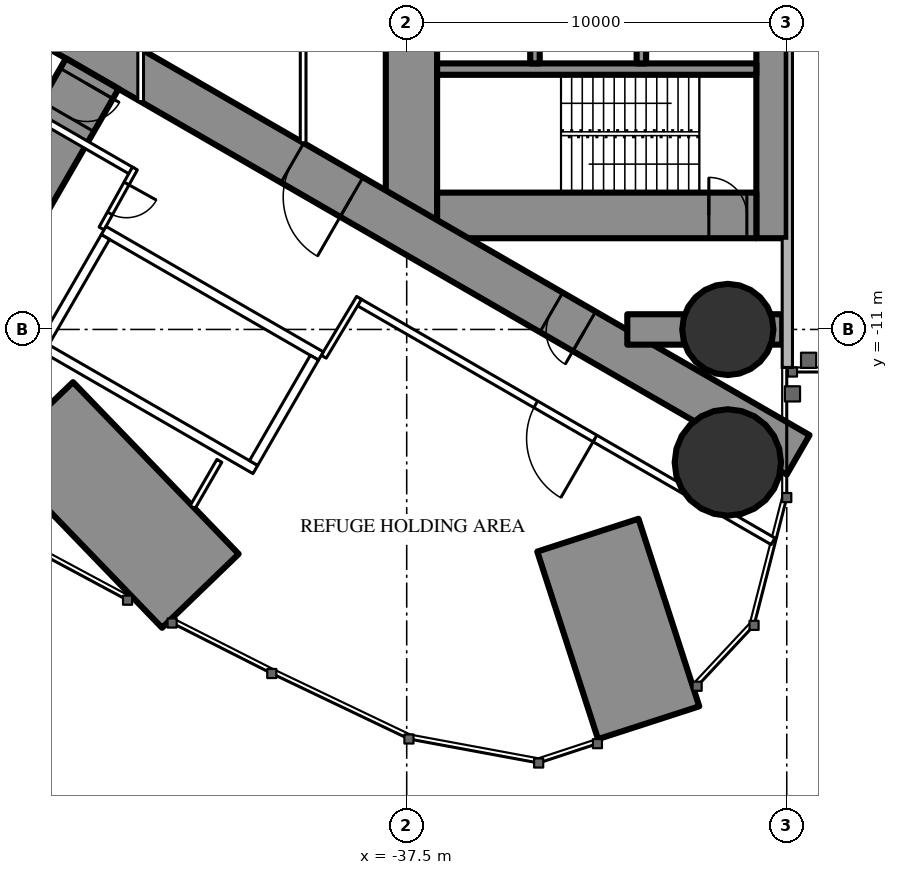
"""IFC4 building model, lengths in metres.
Left out: names, types, materials, properties, quantities, classifications, styles, units other than length and angle.
Written with IfcOpenShell. Run it as: python <this file> out.ifc"""

import sys

from ifc_helpers import new_model, si_unit, direction, frame, frame_2d, origin, origin_2d, place, context, subcontext, project, spatial, rectangle, circle, hollow_circle, extrude, element, fill, save


model = new_model("IFC4")
c1 = context("Model", 3, precision=1e-05, world=origin(), true_north=direction((0.0, 1.0)))
c2 = subcontext(c1, "Body", "Model", "MODEL_VIEW")
j1 = project(units=[si_unit("LENGTHUNIT", "METRE"), si_unit("PLANEANGLEUNIT", "RADIAN")], contexts=[c1])
p1 = place(None, origin())
s1 = spatial("IfcSite", under=j1, at=p1, CompositionType="ELEMENT")
p2 = place(p1, origin())
s2 = spatial("IfcBuilding", under=s1, at=p2, CompositionType="ELEMENT")
p3 = place(p2, frame((0.0, 0.0, 205.3)))
s3 = spatial("IfcBuildingStorey", under=s2, at=p3, CompositionType="ELEMENT", Elevation=205.3)
p4 = place(p3, frame((-31.134, -21.348, 0.0), z_axis=(0.0, 0.0, 1.0), x_axis=(-0.308266410133, 0.951300068529, 0.0)))
e1 = element("IfcWall", 1, at=p4, inside=s3, PredefinedType="SHEAR", context=c2, shape_type="SweptSolid", body=[
    extrude(rectangle(XDim=5.187, YDim=2.8, at=frame_2d((2.593, 0.0))), origin(), (0.0, 0.0, 1.0), 5.0),
])
p5 = place(p3, frame((-29.05, -11.0, 0.0), z_axis=(0.0, 0.0, 1.0), x_axis=(1.0, 0.0, 0.0)))
e2 = element("IfcColumn", 2, at=p5, inside=s3, PredefinedType="COLUMN", context=c2, shape_type="SweptSolid", body=[
    extrude(hollow_circle(Radius=1.2, WallThickness=0.09, at=origin_2d()), origin(), (0.0, 0.0, 1.0), 5.0),
])
p6 = place(p3, frame((-29.05, -14.5, 0.0), z_axis=(0.0, 0.0, 1.0), x_axis=(1.0, 0.0, 0.0)))
e3 = element("IfcColumn", 3, at=p6, inside=s3, PredefinedType="COLUMN", context=c2, shape_type="SweptSolid", body=[
    extrude(circle(Radius=1.4, at=origin_2d()), origin(), (0.0, 0.0, 1.0), 5.0),
])
p7 = place(p3, frame((-42.929, -17.879, 0.0), z_axis=(0.0, 0.0, 1.0), x_axis=(-0.694103918888, 0.719874815356, 0.0)))
e4 = element("IfcWall", 4, at=p7, inside=s3, PredefinedType="SHEAR", context=c2, shape_type="SweptSolid", body=[
    extrude(rectangle(XDim=6.281, YDim=2.8, at=frame_2d((3.141, 0.0))), origin(), (0.0, 0.0, 1.0), 5.0),
])
p8 = place(p3, frame((-27.9, 8.6, 0.0), z_axis=(0.0, 0.0, 1.0), x_axis=(0.0, -1.0, 0.0)))
e5 = element("IfcWall", 5, at=p8, inside=s3, PredefinedType="SHEAR", context=c2, shape_type="SweptSolid", body=[
    extrude(rectangle(XDim=17.2, YDim=0.8, at=frame_2d((8.6, 0.0))), origin(), (0.0, 0.0, 1.0), 5.0),
])
p9 = place(p8, frame((6.95, 0.0, 0.0)))
e6 = element("IfcOpeningElement", 6, at=p9, cuts=e5, PredefinedType="OPENING", context=c2, shape_type="SweptSolid", body=[
    extrude(rectangle(XDim=0.9, YDim=2.2, at=frame_2d((0.45, 1.1))), frame((0.0, 0.41, 0.0), z_axis=(0.0, -1.0, 0.0), x_axis=(1.0, 0.0, 0.0)), (0.0, 0.0, 1.0), 0.82),
])
p10 = place(p3, frame((-37.375, 8.6, 0.0), z_axis=(0.0, 0.0, 1.0), x_axis=(0.0, -1.0, 0.0)))
e7 = element("IfcWall", 7, at=p10, inside=s3, PredefinedType="SHEAR", context=c2, shape_type="SweptSolid", body=[
    extrude(rectangle(XDim=17.2, YDim=1.35, at=frame_2d((8.6, 0.0))), origin(), (0.0, 0.0, 1.0), 5.0),
])
p11 = place(p10, frame((7.7, 0.0, 0.0)))
e8 = element("IfcOpeningElement", 8, at=p11, cuts=e7, PredefinedType="OPENING", context=c2, shape_type="SweptSolid", body=[
    extrude(rectangle(XDim=1.8, YDim=2.2, at=frame_2d((0.9, 1.1))), frame((0.0, 0.685, 0.0), z_axis=(0.0, -1.0, 0.0), x_axis=(1.0, 0.0, 0.0)), (0.0, 0.0, 1.0), 1.37),
])
p12 = place(p3, frame((-28.3, -8.0, 0.0), z_axis=(0.0, 0.0, 1.0), x_axis=(-1.0, 0.0, 0.0)))
e9 = element("IfcWall", 9, at=p12, inside=s3, PredefinedType="SHEAR", context=c2, shape_type="SweptSolid", body=[
    extrude(rectangle(XDim=8.4, YDim=1.2, at=frame_2d((4.2, 0.0))), origin(), (0.0, 0.0, 1.0), 5.0),
])
p13 = place(p12, frame((0.25, 0.0, 0.0)))
e10 = element("IfcOpeningElement", 10, at=p13, cuts=e9, PredefinedType="OPENING", context=c2, shape_type="SweptSolid", body=[
    extrude(rectangle(XDim=1.0, YDim=2.2, at=frame_2d((0.5, 1.1))), frame((0.0, 0.61, 0.0), z_axis=(0.0, -1.0, 0.0), x_axis=(1.0, 0.0, 0.0)), (0.0, 0.0, 1.0), 1.22),
])
p14 = place(p3, frame((-28.3, -4.15, 0.0), z_axis=(0.0, 0.0, 1.0), x_axis=(-1.0, 0.0, 0.0)))
e11 = element("IfcWall", 11, at=p14, inside=s3, PredefinedType="SHEAR", context=c2, shape_type="SweptSolid", body=[
    extrude(rectangle(XDim=8.4, YDim=0.3, at=frame_2d((4.2, 0.0))), origin(), (0.0, 0.0, 1.0), 5.0),
])
p15 = place(p3, frame((-31.325, -1.9, 0.0), z_axis=(0.0, 0.0, 1.0), x_axis=(0.0, -1.0, 0.0)))
e12 = element("IfcWall", 12, at=p15, inside=s3, PredefinedType="SHEAR", context=c2, shape_type="SweptSolid", body=[
    extrude(rectangle(XDim=2.1, YDim=0.25, at=frame_2d((1.05, 0.0))), origin(), (0.0, 0.0, 1.0), 5.0),
])
p16 = place(p15, frame((0.5, 0.0, 0.0)))
e13 = element("IfcOpeningElement", 13, at=p16, cuts=e12, PredefinedType="OPENING", context=c2, shape_type="SweptSolid", body=[
    extrude(rectangle(XDim=1.1, YDim=2.2, at=frame_2d((0.55, 1.1))), frame((0.0, 0.135, 0.0), z_axis=(0.0, -1.0, 0.0), x_axis=(1.0, 0.0, 0.0)), (0.0, 0.0, 1.0), 0.27),
])
p17 = place(p3, frame((-34.125, -1.65, 0.0), z_axis=(0.0, 0.0, 1.0), x_axis=(0.0, -1.0, 0.0)))
e14 = element("IfcWall", 14, at=p17, inside=s3, PredefinedType="SHEAR", context=c2, shape_type="SweptSolid", body=[
    extrude(rectangle(XDim=2.35, YDim=0.25, at=frame_2d((1.175, 0.0))), origin(), (0.0, 0.0, 1.0), 5.0),
])
p18 = place(p17, frame((0.875, 0.0, 0.0)))
e15 = element("IfcOpeningElement", 15, at=p18, cuts=e14, PredefinedType="OPENING", context=c2, shape_type="SweptSolid", body=[
    extrude(rectangle(XDim=0.6, YDim=2.0, at=frame_2d((0.3, 1.0))), frame((0.0, 0.135, 0.0), z_axis=(0.0, -1.0, 0.0), x_axis=(1.0, 0.0, 0.0)), (0.0, 0.0, 1.0), 0.27),
])
p19 = place(p3, frame((-27.2, -14.3, 0.0), z_axis=(0.0, 0.0, 1.0), x_axis=(-0.866024021859, 0.500002393557, 0.0)))
e16 = element("IfcWall", 16, at=p19, inside=s3, PredefinedType="SHEAR", context=c2, shape_type="SweptSolid", body=[
    extrude(rectangle(XDim=27.907, YDim=1.2, at=frame_2d((13.954, 0.0))), origin(), (0.0, 0.0, 1.0), 5.0),
])
p20 = place(p19, frame((6.5, 0.0, 0.0)))
e17 = element("IfcOpeningElement", 17, at=p20, cuts=e16, PredefinedType="OPENING", context=c2, shape_type="SweptSolid", body=[
    extrude(rectangle(XDim=1.0, YDim=2.2, at=frame_2d((0.5, 1.1))), frame((0.0, 0.61, 0.0), z_axis=(0.0, -1.0, 0.0), x_axis=(1.0, 0.0, 0.0)), (0.0, 0.0, 1.0), 1.22),
])
p21 = place(p19, frame((13.568, 0.0, 0.0)))
e18 = element("IfcOpeningElement", 18, at=p21, cuts=e16, PredefinedType="OPENING", context=c2, shape_type="SweptSolid", body=[
    extrude(rectangle(XDim=1.8, YDim=2.2, at=frame_2d((0.9, 1.1))), frame((0.0, 0.61, 0.0), z_axis=(0.0, -1.0, 0.0), x_axis=(1.0, 0.0, 0.0)), (0.0, 0.0, 1.0), 1.22),
])
p22 = place(p3, frame((-27.62, -11.0, 0.0), z_axis=(0.0, 0.0, 1.0), x_axis=(-1.0, 0.0, 0.0)))
e19 = element("IfcWall", 19, at=p22, inside=s3, PredefinedType="SHEAR", context=c2, shape_type="SweptSolid", body=[
    extrude(rectangle(XDim=4.076, YDim=0.8, at=frame_2d((2.038, 0.0))), origin(), (0.0, 0.0, 1.0), 5.0),
])
p23 = place(p3, frame((-45.773, -4.27, 0.0), z_axis=(0.0, 0.0, 1.0), x_axis=(-0.499995723283, -0.866027872934, 0.0)))
e20 = element("IfcWall", 20, at=p23, inside=s3, PredefinedType="SHEAR", context=c2, shape_type="SweptSolid", body=[
    extrude(rectangle(XDim=10.131, YDim=1.6, at=frame_2d((5.065, 0.0))), origin(), (0.0, 0.0, 1.0), 5.0),
])
p24 = place(p23, frame((0.3, 0.0, 0.0)))
e21 = element("IfcOpeningElement", 21, at=p24, cuts=e20, PredefinedType="OPENING", context=c2, shape_type="SweptSolid", body=[
    extrude(rectangle(XDim=1.0, YDim=2.2, at=frame_2d((0.5, 1.1))), frame((0.0, 0.81, 0.0), z_axis=(0.0, -1.0, 0.0), x_axis=(1.0, 0.0, 0.0)), (0.0, 0.0, 1.0), 1.62),
])
p25 = place(p3, frame((-42.429, -14.457, 0.0), z_axis=(0.0, 0.0, 1.0), x_axis=(-0.5000578829, -0.865991982497, 0.0)))
e22 = element("IfcWall", 22, at=p25, inside=s3, PredefinedType="PARTITIONING", context=c2, shape_type="SweptSolid", body=[
    extrude(rectangle(XDim=1.407, YDim=0.15, at=frame_2d((0.704, 0.0))), origin(), (0.0, 0.0, 1.0), 4.75),
])
p26 = place(p3, frame((-27.86, -16.575, 0.0), z_axis=(0.0, 0.0, 1.0), x_axis=(-0.866027756871, 0.499995924312, 0.0)))
e23 = element("IfcWall", 23, at=p26, inside=s3, PredefinedType="PARTITIONING", context=c2, shape_type="SweptSolid", body=[
    extrude(rectangle(XDim=12.622, YDim=0.2, at=frame_2d((6.311, 0.0))), origin(), (0.0, 0.0, 1.0), 4.75),
])
p27 = place(p26, frame((5.411, 0.0, 0.0)))
e24 = element("IfcOpeningElement", 24, at=p27, cuts=e23, PredefinedType="OPENING", context=c2, shape_type="SweptSolid", body=[
    extrude(rectangle(XDim=1.8, YDim=2.2, at=frame_2d((0.9, 1.1))), frame((0.0, 0.11, 0.0), z_axis=(0.0, -1.0, 0.0), x_axis=(1.0, 0.0, 0.0)), (0.0, 0.0, 1.0), 0.22),
])
p28 = place(p3, frame((-44.715, -6.844, 0.0), z_axis=(0.0, 0.0, 1.0), x_axis=(-0.866025261224, 0.500000246922, 0.0)))
e25 = element("IfcWall", 25, at=p28, inside=s3, PredefinedType="PARTITIONING", context=c2, shape_type="SweptSolid", body=[
    extrude(rectangle(XDim=13.567, YDim=0.2, at=frame_2d((6.783, 0.0))), origin(), (0.0, 0.0, 1.0), 4.75),
])
p29 = place(p28, frame((6.719, 0.0, 0.0)))
e26 = element("IfcOpeningElement", 26, at=p29, cuts=e25, PredefinedType="OPENING", context=c2, shape_type="SweptSolid", body=[
    extrude(rectangle(XDim=1.8, YDim=2.2, at=frame_2d((0.9, 1.1))), frame((0.0, 0.11, 0.0), z_axis=(0.0, -1.0, 0.0), x_axis=(1.0, 0.0, 0.0)), (0.0, 0.0, 1.0), 0.22),
])
p30 = place(p3, frame((-44.652, -6.764, 0.0), z_axis=(0.0, 0.0, 1.0), x_axis=(-0.485528096672, -0.8742210632, 0.0)))
e27 = element("IfcWall", 27, at=p30, inside=s3, PredefinedType="PARTITIONING", context=c2, shape_type="SweptSolid", body=[
    extrude(rectangle(XDim=1.805, YDim=0.15, at=frame_2d((0.903, 0.0))), origin(), (0.0, 0.0, 1.0), 4.75),
])
p31 = place(p30, frame((0.453, 0.0, 0.0)))
e28 = element("IfcOpeningElement", 28, at=p31, cuts=e27, PredefinedType="OPENING", context=c2, shape_type="SweptSolid", body=[
    extrude(rectangle(XDim=0.9, YDim=2.2, at=frame_2d((0.45, 1.1))), frame((0.0, 0.085, 0.0), z_axis=(0.0, -1.0, 0.0), x_axis=(1.0, 0.0, 0.0)), (0.0, 0.0, 1.0), 0.17),
])
p32 = place(p3, frame((-39.683, -11.718, 0.0), z_axis=(0.0, 0.0, 1.0), x_axis=(0.514336634837, 0.857588377991, 0.0)))
e29 = element("IfcWall", 29, at=p32, inside=s3, PredefinedType="PARTITIONING", context=c2, shape_type="SweptSolid", body=[
    extrude(rectangle(XDim=1.805, YDim=0.15, at=frame_2d((0.903, 0.0))), origin(), (0.0, 0.0, 1.0), 4.75),
])
p33 = place(p3, frame((-40.225, 6.087, 0.0), z_axis=(0.0, 0.0, 1.0), x_axis=(0.0, -1.0, 0.0)))
e30 = element("IfcWall", 30, at=p33, inside=s3, PredefinedType="PARTITIONING", context=c2, shape_type="SweptSolid", body=[
    extrude(rectangle(XDim=12.174, YDim=0.15, at=frame_2d((6.087, 0.0))), origin(), (0.0, 0.0, 1.0), 4.75),
])
p34 = place(p33, frame((5.187, 0.0, 0.0)))
e31 = element("IfcOpeningElement", 31, at=p34, cuts=e30, PredefinedType="OPENING", context=c2, shape_type="SweptSolid", body=[
    extrude(rectangle(XDim=1.8, YDim=2.2, at=frame_2d((0.9, 1.1))), frame((0.0, 0.085, 0.0), z_axis=(0.0, -1.0, 0.0), x_axis=(1.0, 0.0, 0.0)), (0.0, 0.0, 1.0), 0.17),
])
p35 = place(p3, frame((-44.5, 5.005, 0.0), z_axis=(0.0, 0.0, 1.0), x_axis=(0.0, -1.0, 0.0)))
e32 = element("IfcWall", 32, at=p35, inside=s3, PredefinedType="PARTITIONING", context=c2, shape_type="SweptSolid", body=[
    extrude(rectangle(XDim=10.009, YDim=0.15, at=frame_2d((5.005, 0.0))), origin(), (0.0, 0.0, 1.0), 3.55),
])
p36 = place(p35, frame((4.505, 0.0, 0.0)))
e33 = element("IfcOpeningElement", 33, at=p36, cuts=e32, PredefinedType="OPENING", context=c2, shape_type="SweptSolid", body=[
    extrude(rectangle(XDim=1.0, YDim=2.2, at=frame_2d((0.5, 1.1))), frame((0.0, 0.085, 0.0), z_axis=(0.0, -1.0, 0.0), x_axis=(1.0, 0.0, 0.0)), (0.0, 0.0, 1.0), 0.17),
])
p37 = place(p3, frame((-39.758, -11.697, 0.0), z_axis=(0.0, 0.0, 1.0), x_axis=(-0.866024194504, 0.500002094529, 0.0)))
e34 = element("IfcWall", 34, at=p37, inside=s3, PredefinedType="PARTITIONING", context=c2, shape_type="SweptSolid", body=[
    extrude(rectangle(XDim=6.6, YDim=0.25, at=frame_2d((3.3, 0.0))), origin(), (0.0, 0.0, 1.0), 4.75),
])
p38 = place(p3, frame((-41.482, -14.686, 0.0), z_axis=(0.0, 0.0, 1.0), x_axis=(-0.86603344179, 0.499986077507, 0.0)))
e35 = element("IfcWall", 35, at=p38, inside=s3, PredefinedType="PARTITIONING", context=c2, shape_type="SweptSolid", body=[
    extrude(rectangle(XDim=6.6, YDim=0.25, at=frame_2d((3.3, 0.0))), origin(), (0.0, 0.0, 1.0), 4.75),
])
for number, where, z_axis, x_axis in (
    (36, (-39.928, -11.743, 0.0), (0.0, 0.0, 1.0), (-0.5, -0.866, 0.0)),
    (37, (-45.428, -8.568, 0.0), (0.0, 0.0, 1.0), (-0.5, -0.866, 0.0)),
):
    element("IfcWall", number, at=place(p3, frame(where, z_axis=z_axis, x_axis=x_axis)), inside=s3, PredefinedType="PARTITIONING", context=c2, shape_type="SweptSolid", body=[
        extrude(rectangle(XDim=3.201, YDim=0.25, at=frame_2d((1.6, 0.0))), origin(), (0.0, 0.0, 1.0), 4.75),
    ])
p39 = place(p24, origin())
e38 = element("IfcDoor", 38, at=p39, inside=s3, OperationType="SINGLE_SWING_LEFT", PredefinedType="DOOR", context=c2, shape_type="SweptSolid", body=[
    extrude(rectangle(XDim=1.0, YDim=2.2, at=frame_2d((0.5, 1.1))), frame((0.0, 0.025, 0.0), z_axis=(0.0, -1.0, 0.0), x_axis=(1.0, 0.0, 0.0)), (0.0, 0.0, 1.0), 0.05),
])
fill(e21, e38)
p40 = place(p31, origin())
e39 = element("IfcDoor", 39, at=p40, inside=s3, OperationType="SINGLE_SWING_LEFT", PredefinedType="DOOR", context=c2, shape_type="SweptSolid", body=[
    extrude(rectangle(XDim=0.9, YDim=2.2, at=frame_2d((0.45, 1.1))), frame((0.0, 0.025, 0.0), z_axis=(0.0, -1.0, 0.0), x_axis=(1.0, 0.0, 0.0)), (0.0, 0.0, 1.0), 0.05),
])
fill(e28, e39)
p41 = place(p27, origin())
e40 = element("IfcDoor", 40, at=p41, inside=s3, OperationType="DOUBLE_DOOR_SINGLE_SWING", PredefinedType="DOOR", context=c2, shape_type="SweptSolid", body=[
    extrude(rectangle(XDim=1.8, YDim=2.2, at=frame_2d((0.9, 1.1))), frame((0.0, 0.025, 0.0), z_axis=(0.0, -1.0, 0.0), x_axis=(1.0, 0.0, 0.0)), (0.0, 0.0, 1.0), 0.05),
])
fill(e24, e40)
p42 = place(p20, origin())
e41 = element("IfcDoor", 41, at=p42, inside=s3, OperationType="SINGLE_SWING_LEFT", PredefinedType="DOOR", context=c2, shape_type="SweptSolid", body=[
    extrude(rectangle(XDim=1.0, YDim=2.2, at=frame_2d((0.5, 1.1))), frame((0.0, 0.025, 0.0), z_axis=(0.0, -1.0, 0.0), x_axis=(1.0, 0.0, 0.0)), (0.0, 0.0, 1.0), 0.05),
])
fill(e17, e41)
p43 = place(p21, origin())
e42 = element("IfcDoor", 42, at=p43, inside=s3, OperationType="DOUBLE_DOOR_SINGLE_SWING", PredefinedType="DOOR", context=c2, shape_type="SweptSolid", body=[
    extrude(rectangle(XDim=1.8, YDim=2.2, at=frame_2d((0.9, 1.1))), frame((0.0, 0.025, 0.0), z_axis=(0.0, -1.0, 0.0), x_axis=(1.0, 0.0, 0.0)), (0.0, 0.0, 1.0), 0.05),
])
fill(e18, e42)
p44 = place(p13, origin())
e43 = element("IfcDoor", 43, at=p44, inside=s3, OperationType="SINGLE_SWING_RIGHT", PredefinedType="DOOR", context=c2, shape_type="SweptSolid", body=[
    extrude(rectangle(XDim=1.0, YDim=2.2, at=frame_2d((0.5, 1.1))), frame((0.0, 0.025, 0.0), z_axis=(0.0, -1.0, 0.0), x_axis=(1.0, 0.0, 0.0)), (0.0, 0.0, 1.0), 0.05),
])
fill(e10, e43)
save(model, sys.argv[1])
